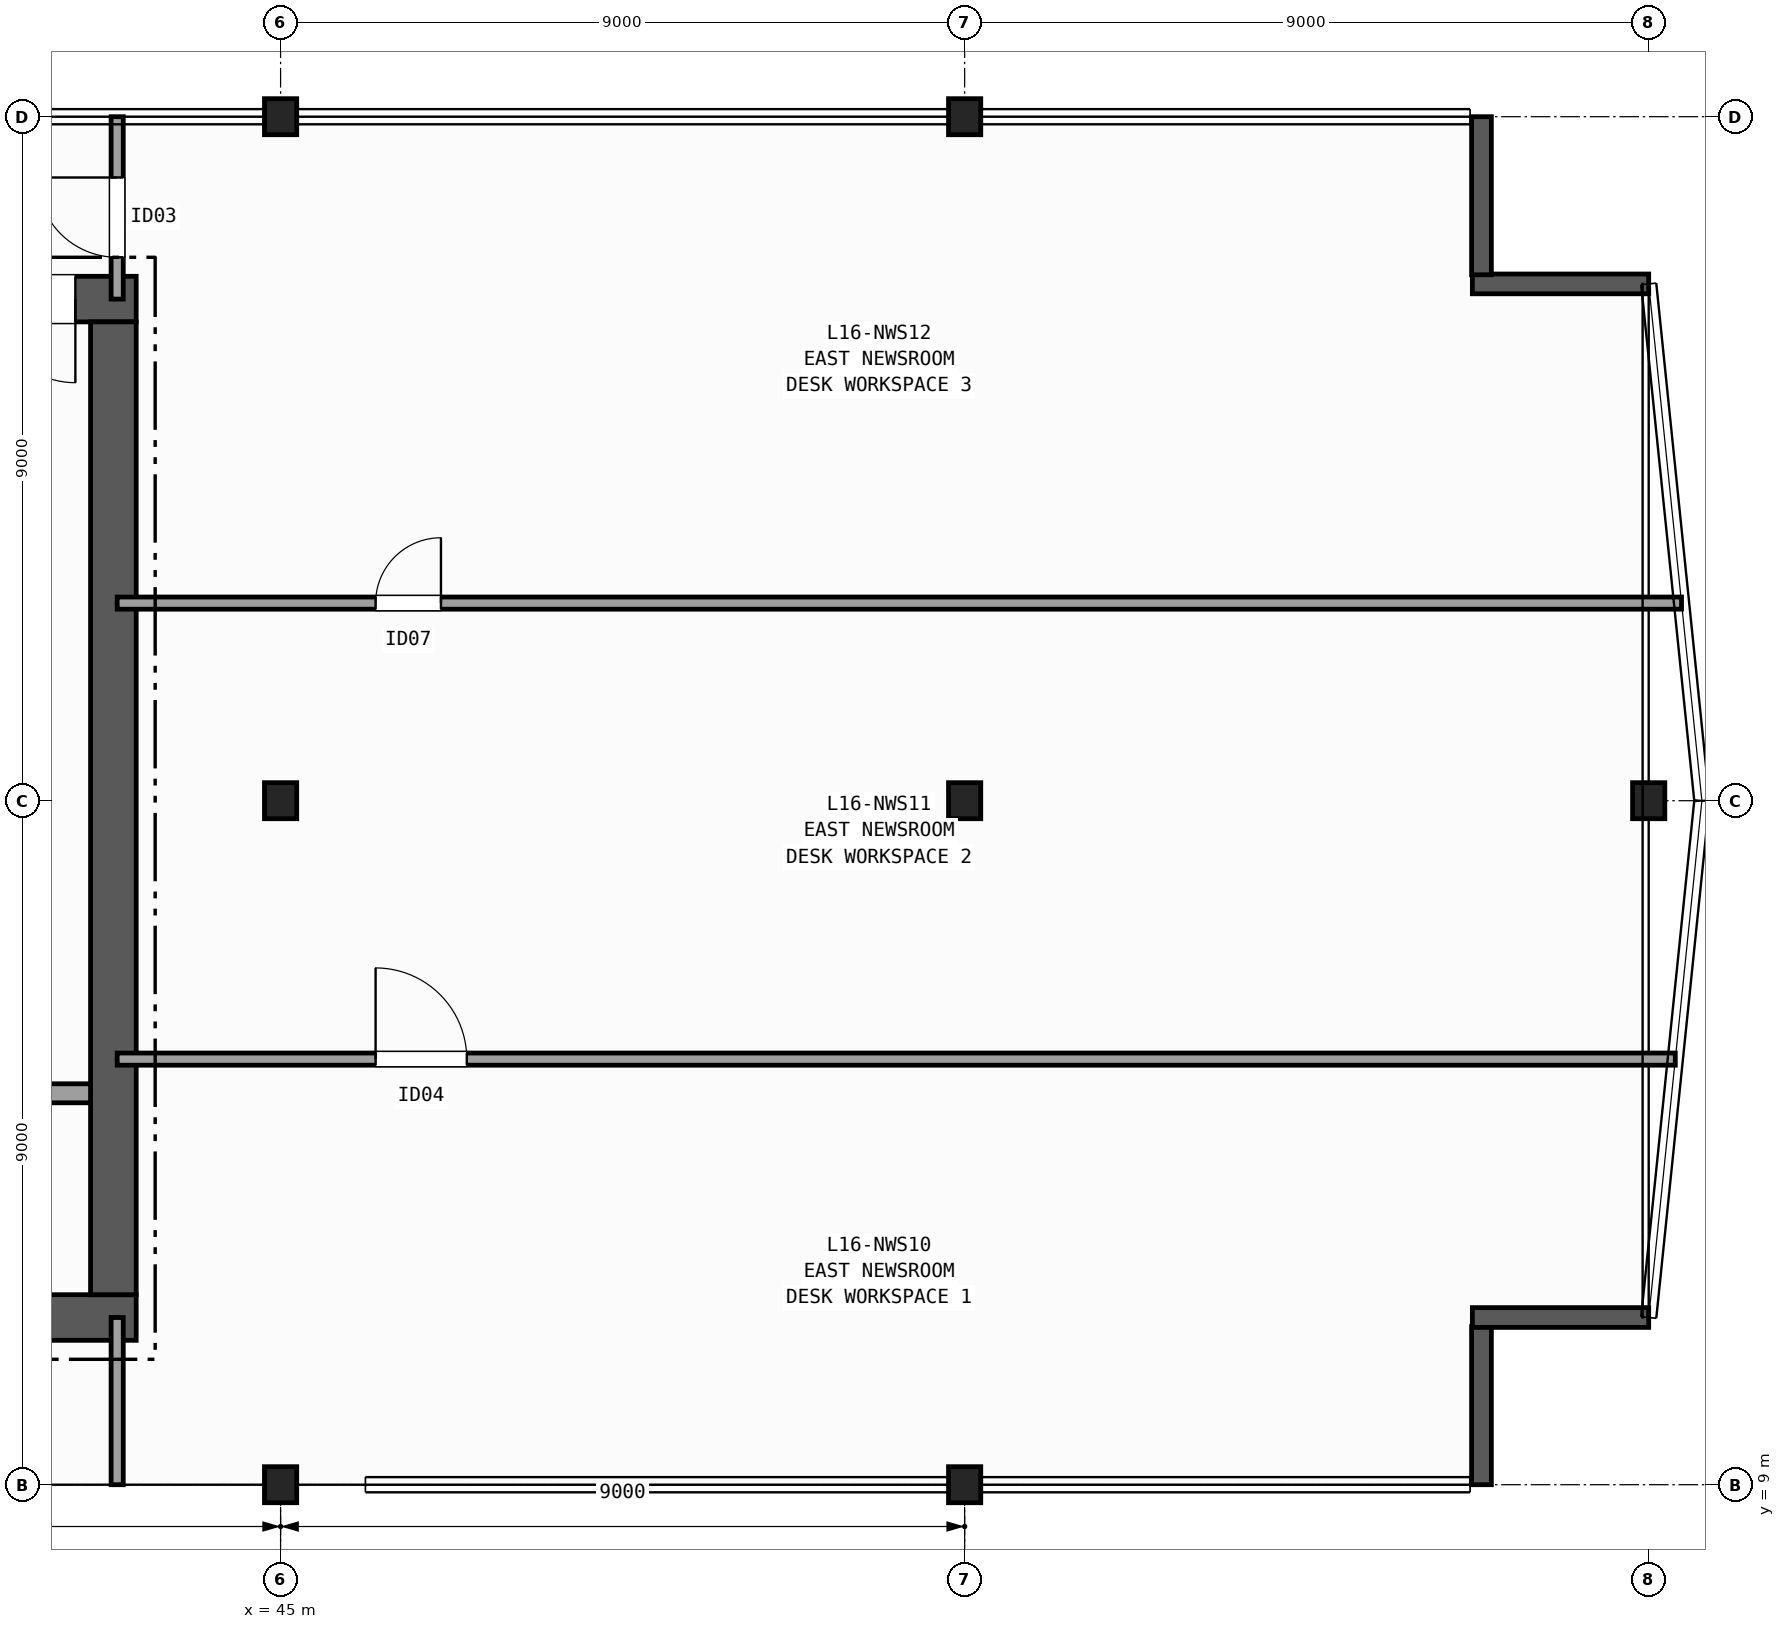
"""IFC4 building model, lengths in metres.
Left out: names, types, materials, properties, quantities, classifications, styles, units other than length and angle.
Written with IfcOpenShell. Run it as: python <this file> out.ifc"""

import sys

from ifc_helpers import new_model, si_unit, direction, frame, frame_2d, origin, origin_2d, place, context, subcontext, project, spatial, rectangle, i_section, extrude, element, fill, save


model = new_model("IFC4")
c1 = context("Model", 3, precision=1e-05, world=origin(), true_north=direction((0.0, 1.0)))
c2 = subcontext(c1, "Body", "Model", "MODEL_VIEW")
j1 = project(units=[si_unit("LENGTHUNIT", "METRE"), si_unit("PLANEANGLEUNIT", "RADIAN")], contexts=[c1])
p1 = place(None, origin())
s1 = spatial("IfcSite", under=j1, at=p1, CompositionType="ELEMENT")
p2 = place(p1, origin())
s2 = spatial("IfcBuilding", under=s1, at=p2, CompositionType="ELEMENT")
p3 = place(p2, frame((0.0, 0.0, 69.3)))
s3 = spatial("IfcBuildingStorey", under=s2, at=p3, CompositionType="ELEMENT", Elevation=69.3)
for number, where, z_axis, x_axis in (
    (1, (45.0, 9.0, 0.0), (0.0, 0.0, 1.0), (1.0, 0.0, 0.0)),
    (2, (45.0, 18.0, 0.0), (0.0, 0.0, 1.0), (1.0, 0.0, 0.0)),
    (3, (45.0, 27.0, 0.0), (0.0, 0.0, 1.0), (1.0, 0.0, 0.0)),
    (4, (54.0, 9.0, 0.0), (0.0, 0.0, 1.0), (1.0, 0.0, 0.0)),
    (5, (54.0, 18.0, 0.0), (0.0, 0.0, 1.0), (1.0, 0.0, 0.0)),
    (6, (54.0, 27.0, 0.0), (0.0, 0.0, 1.0), (1.0, 0.0, 0.0)),
    (7, (63.0, 18.0, 0.0), (0.0, 0.0, 1.0), (1.0, 0.0, 0.0)),
):
    element("IfcColumn", number, at=place(p3, frame(where, z_axis=z_axis, x_axis=x_axis)), inside=s3, PredefinedType="COLUMN", context=c2, shape_type="SweptSolid", body=[
        extrude(i_section(OverallWidth=0.424, OverallDepth=0.474, WebThickness=0.048, FlangeThickness=0.077, FilletRadius=0.015, at=origin_2d()), origin(), (0.0, 0.0, 1.0), 3.7),
    ])
p4 = place(p3, frame((60.8, 9.0, 0.0), z_axis=(0.0, 0.0, 1.0), x_axis=(0.0, 1.0, 0.0)))
e8 = element("IfcWall", 8, at=p4, inside=s3, PredefinedType="SOLIDWALL", context=c2, shape_type="SweptSolid", body=[
    extrude(rectangle(XDim=2.08, YDim=0.26, at=frame_2d((1.04, 0.0))), origin(), (0.0, 0.0, 1.0), 3.42),
])
for number, where, z_axis, x_axis in (
    (9, (60.68, 11.2, 0.0), (0.0, 0.0, 1.0), (1.0, 0.0, 0.0)),
    (10, (63.0, 24.8, 0.0), (0.0, 0.0, 1.0), (-1.0, 0.0, 0.0)),
):
    element("IfcWall", number, at=place(p3, frame(where, z_axis=z_axis, x_axis=x_axis)), inside=s3, PredefinedType="SOLIDWALL", context=c2, shape_type="SweptSolid", body=[
        extrude(rectangle(XDim=2.32, YDim=0.26, at=frame_2d((1.16, 0.0))), origin(), (0.0, 0.0, 1.0), 3.42),
    ])
p5 = place(p3, frame((60.8, 24.92, 0.0), z_axis=(0.0, 0.0, 1.0), x_axis=(0.0, 1.0, 0.0)))
e11 = element("IfcWall", 11, at=p5, inside=s3, PredefinedType="SOLIDWALL", context=c2, shape_type="SweptSolid", body=[
    extrude(rectangle(XDim=2.08, YDim=0.26, at=frame_2d((1.04, 0.0))), origin(), (0.0, 0.0, 1.0), 3.42),
])
p6 = place(p3, frame((29.1, 11.2, 0.0), z_axis=(0.0, 0.0, 1.0), x_axis=(1.0, 0.0, 0.0)))
e12 = element("IfcWall", 12, at=p6, inside=s3, PredefinedType="SHEAR", context=c2, shape_type="SweptSolid", body=[
    extrude(rectangle(XDim=14.0, YDim=0.6, at=frame_2d((7.0, 0.0))), origin(), (0.0, 0.0, 1.0), 3.42),
])
p7 = place(p3, frame((43.1, 24.6, 0.0), z_axis=(0.0, 0.0, 1.0), x_axis=(-1.0, 0.0, 0.0)))
e13 = element("IfcWall", 13, at=p7, inside=s3, PredefinedType="SHEAR", context=c2, shape_type="SweptSolid", body=[
    extrude(rectangle(XDim=14.0, YDim=0.6, at=frame_2d((7.0, 0.0))), origin(), (0.0, 0.0, 1.0), 3.42),
])
p8 = place(p7, frame((0.8, 0.0, 0.0)))
e14 = element("IfcOpeningElement", 14, at=p8, cuts=e13, PredefinedType="OPENING", context=c2, shape_type="SweptSolid", body=[
    extrude(rectangle(XDim=1.1, YDim=2.15, at=frame_2d((0.55, 1.075))), frame((0.0, 0.31, 0.0), z_axis=(0.0, -1.0, 0.0), x_axis=(1.0, 0.0, 0.0)), (0.0, 0.0, 1.0), 0.62),
])
p9 = place(p7, frame((2.3, 0.0, 0.0)))
e15 = element("IfcOpeningElement", 15, at=p9, cuts=e13, PredefinedType="OPENING", context=c2, shape_type="SweptSolid", body=[
    extrude(rectangle(XDim=0.9, YDim=2.1, at=frame_2d((0.45, 1.05))), frame((0.0, 0.31, 0.0), z_axis=(0.0, -1.0, 0.0), x_axis=(1.0, 0.0, 0.0)), (0.0, 0.0, 1.0), 0.62),
])
p10 = place(p7, frame((3.6, 0.0, 0.0)))
e16 = element("IfcOpeningElement", 16, at=p10, cuts=e13, PredefinedType="OPENING", context=c2, shape_type="SweptSolid", body=[
    extrude(rectangle(XDim=0.9, YDim=2.1, at=frame_2d((0.45, 1.05))), frame((0.0, 0.31, 0.0), z_axis=(0.0, -1.0, 0.0), x_axis=(1.0, 0.0, 0.0)), (0.0, 0.0, 1.0), 0.62),
])
p11 = place(p7, frame((4.95, 0.0, 0.0)))
e17 = element("IfcOpeningElement", 17, at=p11, cuts=e13, PredefinedType="OPENING", context=c2, shape_type="SweptSolid", body=[
    extrude(rectangle(XDim=0.9, YDim=2.1, at=frame_2d((0.45, 1.05))), frame((0.0, 0.31, 0.0), z_axis=(0.0, -1.0, 0.0), x_axis=(1.0, 0.0, 0.0)), (0.0, 0.0, 1.0), 0.62),
])
p12 = place(p3, frame((42.8, 11.5, 0.0), z_axis=(0.0, 0.0, 1.0), x_axis=(0.0, 1.0, 0.0)))
e18 = element("IfcWall", 18, at=p12, inside=s3, PredefinedType="SHEAR", context=c2, shape_type="SweptSolid", body=[
    extrude(rectangle(XDim=12.8, YDim=0.6, at=frame_2d((6.4, 0.0))), origin(), (0.0, 0.0, 1.0), 3.42),
])
p13 = place(p3, frame((33.07, 14.15, 0.0), z_axis=(0.0, 0.0, 1.0), x_axis=(1.0, 0.0, 0.0)))
e19 = element("IfcWall", 19, at=p13, inside=s3, PredefinedType="PARTITIONING", context=c2, shape_type="SweptSolid", body=[
    extrude(rectangle(XDim=9.43, YDim=0.25, at=frame_2d((4.715, 0.0))), origin(), (0.0, 0.0, 1.0), 3.42),
])
p14 = place(p13, frame((0.755, 0.0, 0.0)))
e20 = element("IfcOpeningElement", 20, at=p14, cuts=e19, PredefinedType="OPENING", context=c2, shape_type="SweptSolid", body=[
    extrude(rectangle(XDim=1.15, YDim=2.15, at=frame_2d((0.575, 1.075))), frame((0.0, 0.135, 0.0), z_axis=(0.0, -1.0, 0.0), x_axis=(1.0, 0.0, 0.0)), (0.0, 0.0, 1.0), 0.27),
])
p15 = place(p13, frame((3.355, 0.0, 0.0)))
e21 = element("IfcOpeningElement", 21, at=p15, cuts=e19, PredefinedType="OPENING", context=c2, shape_type="SweptSolid", body=[
    extrude(rectangle(XDim=1.15, YDim=2.15, at=frame_2d((0.575, 1.075))), frame((0.0, 0.135, 0.0), z_axis=(0.0, -1.0, 0.0), x_axis=(1.0, 0.0, 0.0)), (0.0, 0.0, 1.0), 0.27),
])
p16 = place(p3, frame((42.85, 9.0, 0.0), z_axis=(0.0, 0.0, 1.0), x_axis=(0.0, 1.0, 0.0)))
e22 = element("IfcWall", 22, at=p16, inside=s3, PredefinedType="PARTITIONING", context=c2, shape_type="SweptSolid", body=[
    extrude(rectangle(XDim=2.2, YDim=0.16, at=frame_2d((1.1, 0.0))), origin(), (0.0, 0.0, 1.0), 2.627),
])
p17 = place(p3, frame((42.85, 24.6, 0.0), z_axis=(0.0, 0.0, 1.0), x_axis=(0.0, 1.0, 0.0)))
e23 = element("IfcWall", 23, at=p17, inside=s3, PredefinedType="PARTITIONING", context=c2, shape_type="SweptSolid", body=[
    extrude(rectangle(XDim=2.4, YDim=0.16, at=frame_2d((1.2, 0.0))), origin(), (0.0, 0.0, 1.0), 2.627),
])
p18 = place(p17, frame((0.55, 0.0, 0.0)))
e24 = element("IfcOpeningElement", 24, at=p18, cuts=e23, PredefinedType="OPENING", context=c2, shape_type="SweptSolid", body=[
    extrude(rectangle(XDim=1.05, YDim=2.15, at=frame_2d((0.525, 1.075))), frame((0.0, 0.09, 0.0), z_axis=(0.0, -1.0, 0.0), x_axis=(1.0, 0.0, 0.0)), (0.0, 0.0, 1.0), 0.18),
])
p19 = place(p3, frame((42.85, 14.6, 0.0), z_axis=(0.0, 0.0, 1.0), x_axis=(1.0, 0.0, 0.0)))
e25 = element("IfcWall", 25, at=p19, inside=s3, PredefinedType="PARTITIONING", context=c2, shape_type="SweptSolid", body=[
    extrude(rectangle(XDim=20.5, YDim=0.16, at=frame_2d((10.25, 0.0))), origin(), (0.0, 0.0, 1.0), 3.42),
])
p20 = place(p19, frame((3.4, 0.0, 0.0)))
e26 = element("IfcOpeningElement", 26, at=p20, cuts=e25, PredefinedType="OPENING", context=c2, shape_type="SweptSolid", body=[
    extrude(rectangle(XDim=1.2, YDim=2.15, at=frame_2d((0.6, 1.075))), frame((0.0, 0.09, 0.0), z_axis=(0.0, -1.0, 0.0), x_axis=(1.0, 0.0, 0.0)), (0.0, 0.0, 1.0), 0.18),
])
p21 = place(p3, frame((42.85, 20.6, 0.0), z_axis=(0.0, 0.0, 1.0), x_axis=(1.0, 0.0, 0.0)))
e27 = element("IfcWall", 27, at=p21, inside=s3, PredefinedType="PARTITIONING", context=c2, shape_type="SweptSolid", body=[
    extrude(rectangle(XDim=20.582, YDim=0.16, at=frame_2d((10.291, 0.0))), origin(), (0.0, 0.0, 1.0), 3.42),
])
p22 = place(p21, frame((3.4, 0.0, 0.0)))
e28 = element("IfcOpeningElement", 28, at=p22, cuts=e27, PredefinedType="OPENING", context=c2, shape_type="SweptSolid", body=[
    extrude(rectangle(XDim=0.86, YDim=2.05, at=frame_2d((0.43, 1.025))), frame((0.0, 0.09, 0.0), z_axis=(0.0, -1.0, 0.0), x_axis=(1.0, 0.0, 0.0)), (0.0, 0.0, 1.0), 0.18),
])
p23 = place(p8, origin())
e29 = element("IfcDoor", 29, at=p23, inside=s3, OperationType="SINGLE_SWING_LEFT", PredefinedType="DOOR", context=c2, shape_type="SweptSolid", body=[
    extrude(rectangle(XDim=1.1, YDim=2.15, at=frame_2d((0.55, 1.075))), frame((0.0, 0.025, 0.0), z_axis=(0.0, -1.0, 0.0), x_axis=(1.0, 0.0, 0.0)), (0.0, 0.0, 1.0), 0.05),
])
fill(e14, e29)
p24 = place(p18, origin())
e30 = element("IfcDoor", 30, at=p24, inside=s3, OperationType="SINGLE_SWING_RIGHT", PredefinedType="DOOR", context=c2, shape_type="SweptSolid", body=[
    extrude(rectangle(XDim=1.05, YDim=2.15, at=frame_2d((0.525, 1.075))), frame((0.0, 0.025, 0.0), z_axis=(0.0, -1.0, 0.0), x_axis=(1.0, 0.0, 0.0)), (0.0, 0.0, 1.0), 0.05),
])
fill(e24, e30)
p25 = place(p20, origin())
e31 = element("IfcDoor", 31, at=p25, inside=s3, OperationType="SINGLE_SWING_LEFT", PredefinedType="DOOR", context=c2, shape_type="SweptSolid", body=[
    extrude(rectangle(XDim=1.2, YDim=2.15, at=frame_2d((0.6, 1.075))), frame((0.0, 0.025, 0.0), z_axis=(0.0, -1.0, 0.0), x_axis=(1.0, 0.0, 0.0)), (0.0, 0.0, 1.0), 0.05),
])
fill(e26, e31)
p26 = place(p22, origin())
e32 = element("IfcDoor", 32, at=p26, inside=s3, OperationType="SINGLE_SWING_RIGHT", PredefinedType="DOOR", context=c2, shape_type="SweptSolid", body=[
    extrude(rectangle(XDim=0.86, YDim=2.05, at=frame_2d((0.43, 1.025))), frame((0.0, 0.025, 0.0), z_axis=(0.0, -1.0, 0.0), x_axis=(1.0, 0.0, 0.0)), (0.0, 0.0, 1.0), 0.05),
])
fill(e28, e32)
save(model, sys.argv[1])
